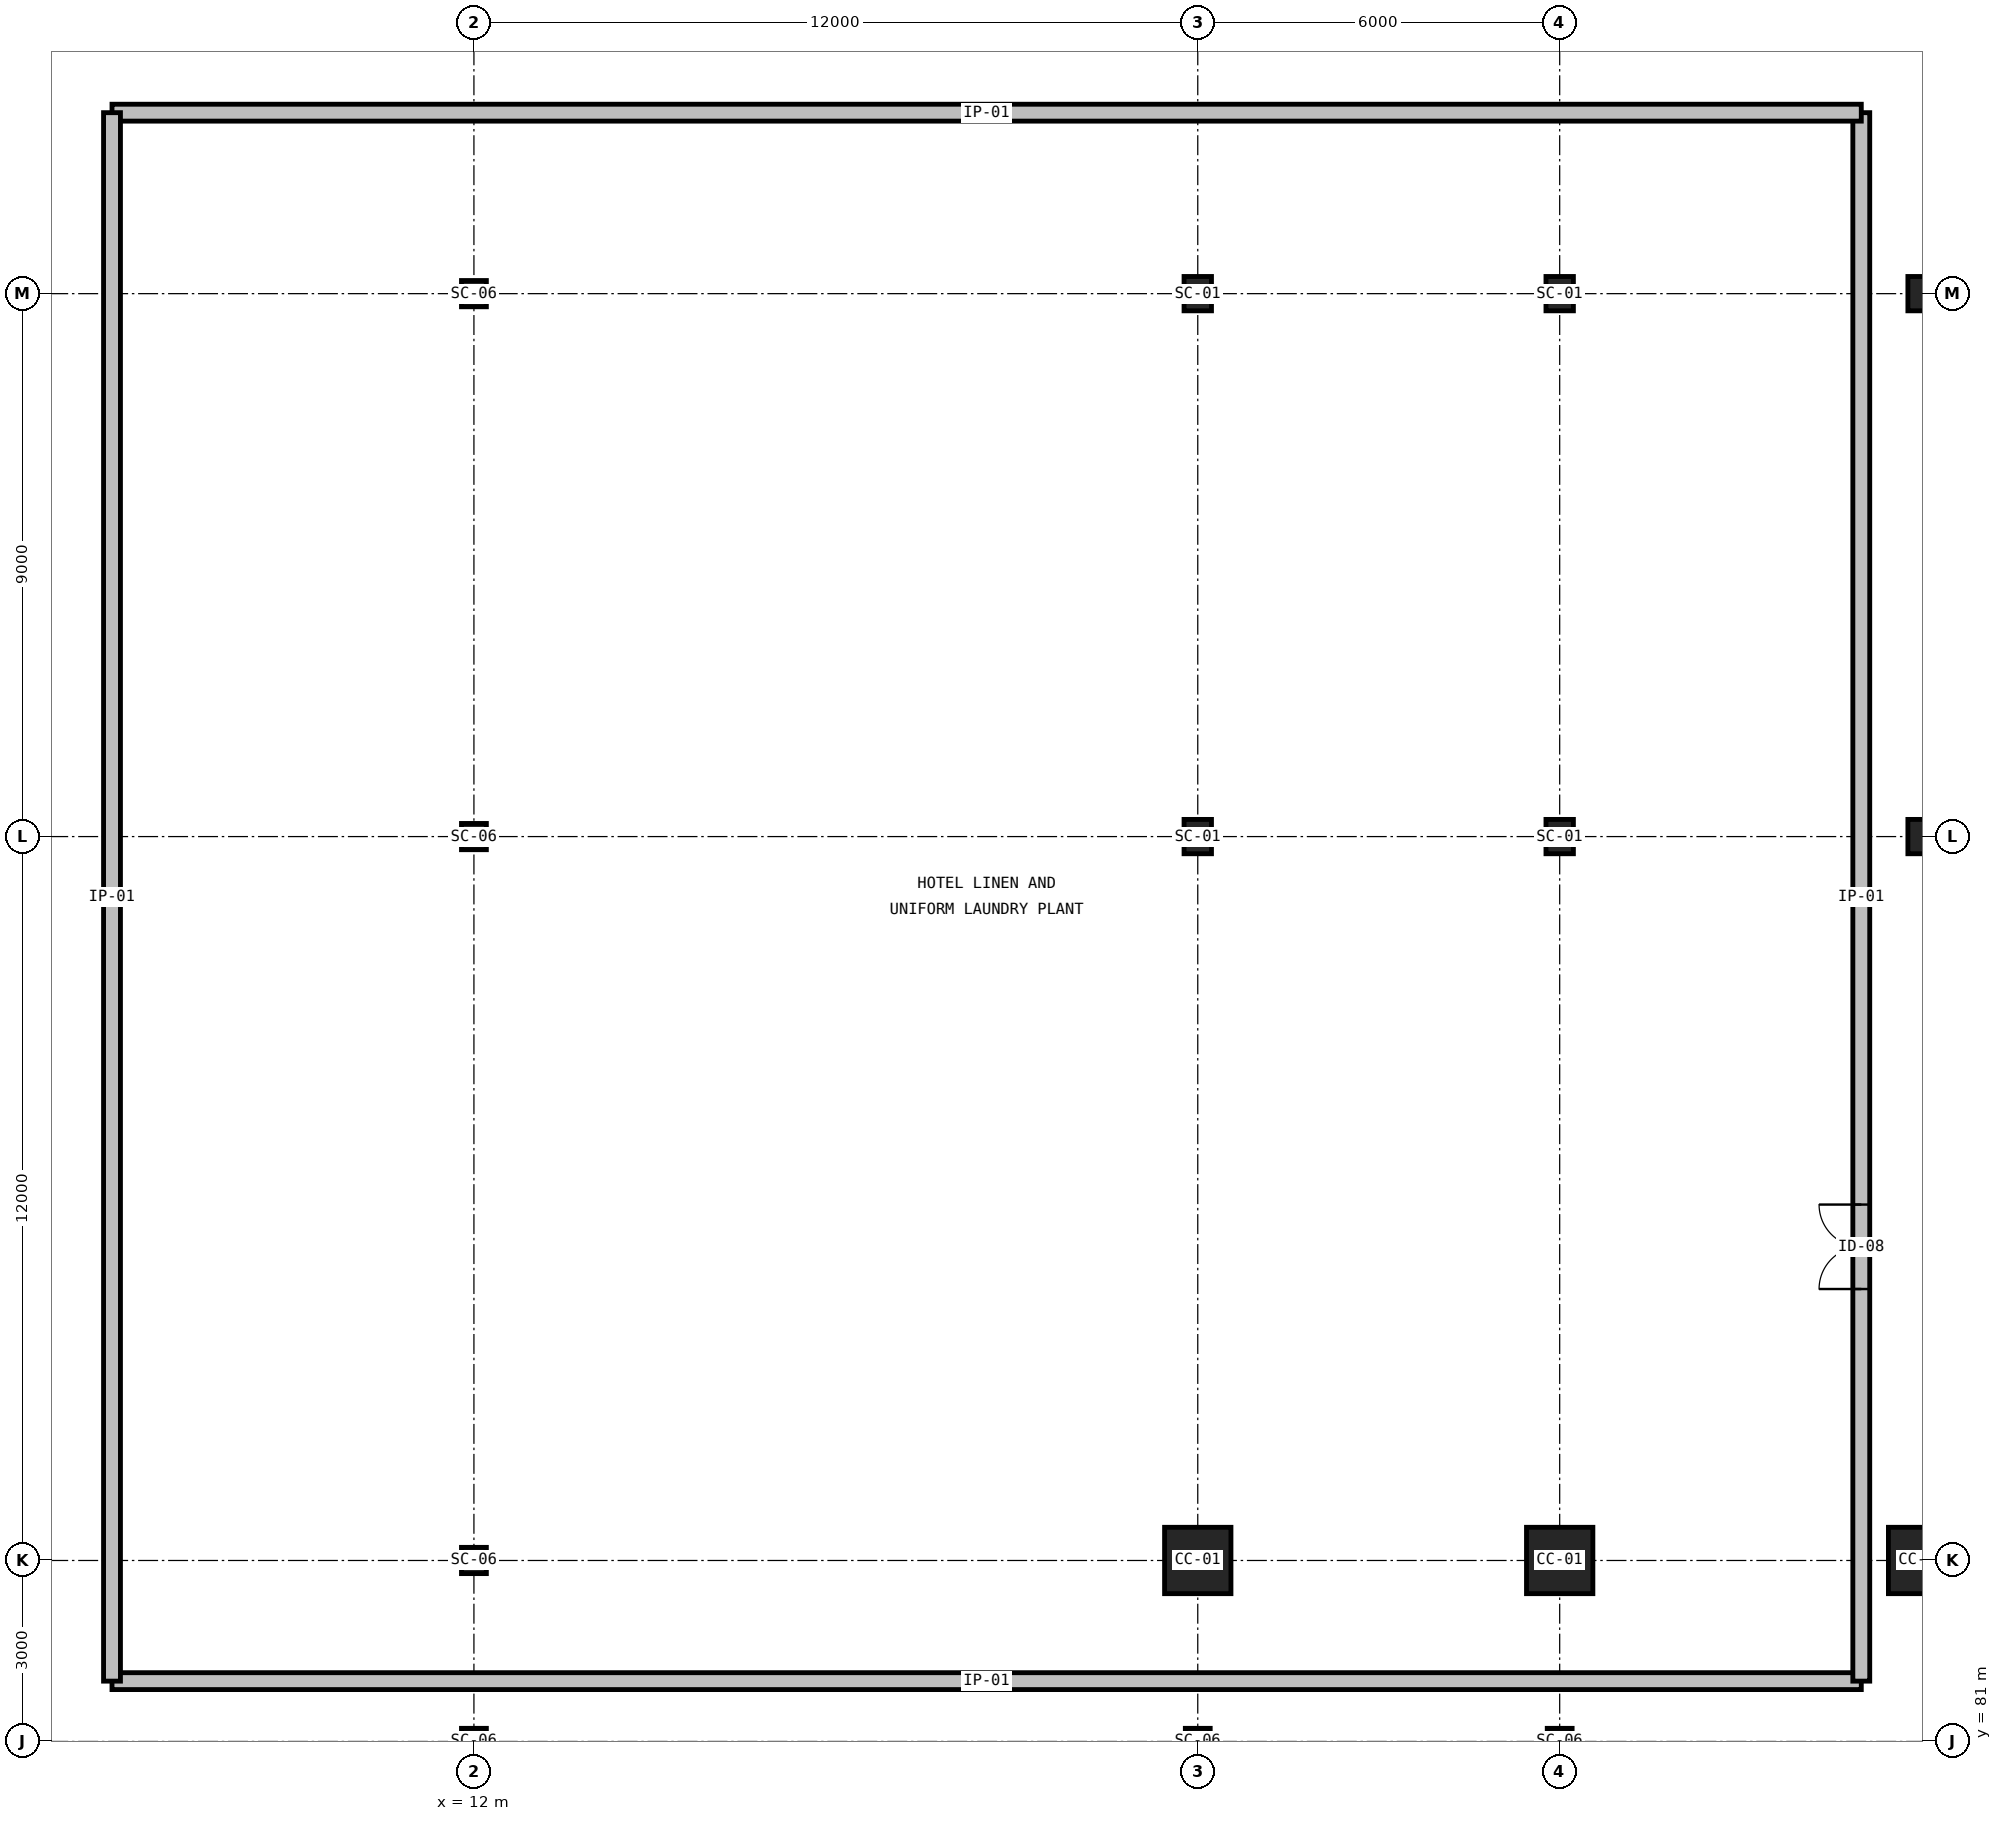
"""IFC4 building model, lengths in metres.
Left out: names, types, materials, properties, quantities, classifications, styles, units other than length and angle.
Written with IfcOpenShell. Run it as: python <this file> out.ifc"""

import sys

from ifc_helpers import new_model, si_unit, direction, frame, frame_2d, origin, origin_2d, place, context, subcontext, project, spatial, rectangle, i_section, extrude, element, fill, save


model = new_model("IFC4")
c1 = context("Model", 3, precision=1e-05, world=origin(), true_north=direction((0.0, 1.0)))
c2 = subcontext(c1, "Body", "Model", "MODEL_VIEW")
j1 = project(units=[si_unit("LENGTHUNIT", "METRE"), si_unit("PLANEANGLEUNIT", "RADIAN")], contexts=[c1])
p1 = place(None, origin())
s1 = spatial("IfcSite", under=j1, at=p1, CompositionType="ELEMENT")
p2 = place(p1, origin())
s2 = spatial("IfcBuilding", under=s1, at=p2, CompositionType="ELEMENT")
p3 = place(p2, frame((0.0, 0.0, -5.4)))
s3 = spatial("IfcBuildingStorey", under=s2, at=p3, CompositionType="ELEMENT", Elevation=-5.4)
for number, where, z_axis, x_axis in (
    (1, (12.0, 81.0, 0.0), (0.0, 0.0, 1.0), (1.0, 0.0, 0.0)),
    (2, (12.0, 84.0, 0.0), (0.0, 0.0, 1.0), (1.0, 0.0, 0.0)),
    (3, (12.0, 96.0, 0.0), (0.0, 0.0, 1.0), (1.0, 0.0, 0.0)),
    (4, (12.0, 105.0, 0.0), (0.0, 0.0, 1.0), (1.0, 0.0, 0.0)),
    (5, (24.0, 81.0, 0.0), (0.0, 0.0, 1.0), (1.0, 0.0, 0.0)),
):
    element("IfcColumn", number, at=place(p3, frame(where, z_axis=z_axis, x_axis=x_axis)), inside=s3, PredefinedType="COLUMN", context=c2, shape_type="SweptSolid", body=[
        extrude(i_section(OverallWidth=0.412, OverallDepth=0.435, WebThickness=0.036, FlangeThickness=0.057, FilletRadius=0.031, at=origin_2d()), origin(), (0.0, 0.0, 1.0), 5.4),
    ])
p4 = place(p3, frame((24.0, 84.0, 0.0), z_axis=(0.0, 0.0, 1.0), x_axis=(1.0, 0.0, 0.0)))
e6 = element("IfcColumn", 6, at=p4, inside=s3, PredefinedType="COLUMN", context=c2, shape_type="SweptSolid", body=[
    extrude(rectangle(XDim=1.1, YDim=1.1, at=origin_2d()), origin(), (0.0, 0.0, 1.0), 5.4),
])
for number, where, z_axis, x_axis in (
    (7, (24.0, 96.0, 0.0), (0.0, 0.0, 1.0), (1.0, 0.0, 0.0)),
    (8, (24.0, 105.0, 0.0), (0.0, 0.0, 1.0), (1.0, 0.0, 0.0)),
):
    element("IfcColumn", number, at=place(p3, frame(where, z_axis=z_axis, x_axis=x_axis)), inside=s3, PredefinedType="COLUMN", context=c2, shape_type="SweptSolid", body=[
        extrude(i_section(OverallWidth=0.454, OverallDepth=0.569, WebThickness=0.078, FlangeThickness=0.125, FilletRadius=0.031, at=origin_2d()), origin(), (0.0, 0.0, 1.0), 5.4),
    ])
p5 = place(p3, frame((30.0, 81.0, 0.0), z_axis=(0.0, 0.0, 1.0), x_axis=(1.0, 0.0, 0.0)))
e9 = element("IfcColumn", 9, at=p5, inside=s3, PredefinedType="COLUMN", context=c2, shape_type="SweptSolid", body=[
    extrude(i_section(OverallWidth=0.412, OverallDepth=0.435, WebThickness=0.036, FlangeThickness=0.057, FilletRadius=0.031, at=origin_2d()), origin(), (0.0, 0.0, 1.0), 5.4),
])
p6 = place(p3, frame((30.0, 84.0, 0.0), z_axis=(0.0, 0.0, 1.0), x_axis=(1.0, 0.0, 0.0)))
e10 = element("IfcColumn", 10, at=p6, inside=s3, PredefinedType="COLUMN", context=c2, shape_type="SweptSolid", body=[
    extrude(rectangle(XDim=1.1, YDim=1.1, at=origin_2d()), origin(), (0.0, 0.0, 1.0), 5.4),
])
for number, where, z_axis, x_axis in (
    (11, (30.0, 96.0, 0.0), (0.0, 0.0, 1.0), (1.0, 0.0, 0.0)),
    (12, (30.0, 105.0, 0.0), (0.0, 0.0, 1.0), (1.0, 0.0, 0.0)),
):
    element("IfcColumn", number, at=place(p3, frame(where, z_axis=z_axis, x_axis=x_axis)), inside=s3, PredefinedType="COLUMN", context=c2, shape_type="SweptSolid", body=[
        extrude(i_section(OverallWidth=0.454, OverallDepth=0.569, WebThickness=0.078, FlangeThickness=0.125, FilletRadius=0.031, at=origin_2d()), origin(), (0.0, 0.0, 1.0), 5.4),
    ])
p7 = place(p3, frame((36.0, 84.0, 0.0), z_axis=(0.0, 0.0, 1.0), x_axis=(1.0, 0.0, 0.0)))
e13 = element("IfcColumn", 13, at=p7, inside=s3, PredefinedType="COLUMN", context=c2, shape_type="SweptSolid", body=[
    extrude(rectangle(XDim=1.1, YDim=1.1, at=origin_2d()), origin(), (0.0, 0.0, 1.0), 5.4),
])
for number, where, z_axis, x_axis in (
    (14, (36.0, 96.0, 0.0), (0.0, 0.0, 1.0), (1.0, 0.0, 0.0)),
    (15, (36.0, 105.0, 0.0), (0.0, 0.0, 1.0), (1.0, 0.0, 0.0)),
):
    element("IfcColumn", number, at=place(p3, frame(where, z_axis=z_axis, x_axis=x_axis)), inside=s3, PredefinedType="COLUMN", context=c2, shape_type="SweptSolid", body=[
        extrude(i_section(OverallWidth=0.454, OverallDepth=0.569, WebThickness=0.078, FlangeThickness=0.125, FilletRadius=0.031, at=origin_2d()), origin(), (0.0, 0.0, 1.0), 5.4),
    ])
p8 = place(p3, frame((6.0, 82.0, 0.0), z_axis=(0.0, 0.0, 1.0), x_axis=(1.0, 0.0, 0.0)))
e16 = element("IfcWall", 16, at=p8, inside=s3, PredefinedType="PARTITIONING", context=c2, shape_type="SweptSolid", body=[
    extrude(rectangle(XDim=29.0, YDim=0.28, at=frame_2d((14.5, 0.0))), origin(), (0.0, 0.0, 1.0), 4.96),
])
p9 = place(p3, frame((35.0, 82.0, 0.0), z_axis=(0.0, 0.0, 1.0), x_axis=(0.0, 1.0, 0.0)))
e17 = element("IfcWall", 17, at=p9, inside=s3, PredefinedType="PARTITIONING", context=c2, shape_type="SweptSolid", body=[
    extrude(rectangle(XDim=26.0, YDim=0.28, at=frame_2d((13.0, 0.0))), origin(), (0.0, 0.0, 1.0), 4.96),
])
p10 = place(p9, frame((6.5, 0.0, 0.0)))
e18 = element("IfcOpeningElement", 18, at=p10, cuts=e17, PredefinedType="OPENING", context=c2, shape_type="SweptSolid", body=[
    extrude(rectangle(XDim=1.4, YDim=2.2, at=frame_2d((0.7, 1.1))), frame((0.0, 0.155, 0.0), z_axis=(0.0, -1.0, 0.0), x_axis=(1.0, 0.0, 0.0)), (0.0, 0.0, 1.0), 0.31),
])
p11 = place(p3, frame((35.0, 108.0, 0.0), z_axis=(0.0, 0.0, 1.0), x_axis=(-1.0, 0.0, 0.0)))
e19 = element("IfcWall", 19, at=p11, inside=s3, PredefinedType="PARTITIONING", context=c2, shape_type="SweptSolid", body=[
    extrude(rectangle(XDim=29.0, YDim=0.28, at=frame_2d((14.5, 0.0))), origin(), (0.0, 0.0, 1.0), 4.96),
])
p12 = place(p3, frame((6.0, 108.0, 0.0), z_axis=(0.0, 0.0, 1.0), x_axis=(0.0, -1.0, 0.0)))
e20 = element("IfcWall", 20, at=p12, inside=s3, PredefinedType="PARTITIONING", context=c2, shape_type="SweptSolid", body=[
    extrude(rectangle(XDim=26.0, YDim=0.28, at=frame_2d((13.0, 0.0))), origin(), (0.0, 0.0, 1.0), 4.96),
])
p13 = place(p10, origin())
e21 = element("IfcDoor", 21, at=p13, inside=s3, OperationType="DOUBLE_DOOR_SINGLE_SWING", PredefinedType="DOOR", context=c2, shape_type="SweptSolid", body=[
    extrude(rectangle(XDim=1.4, YDim=2.2, at=frame_2d((0.7, 1.1))), frame((0.0, 0.025, 0.0), z_axis=(0.0, -1.0, 0.0), x_axis=(1.0, 0.0, 0.0)), (0.0, 0.0, 1.0), 0.05),
])
fill(e18, e21)
save(model, sys.argv[1])
